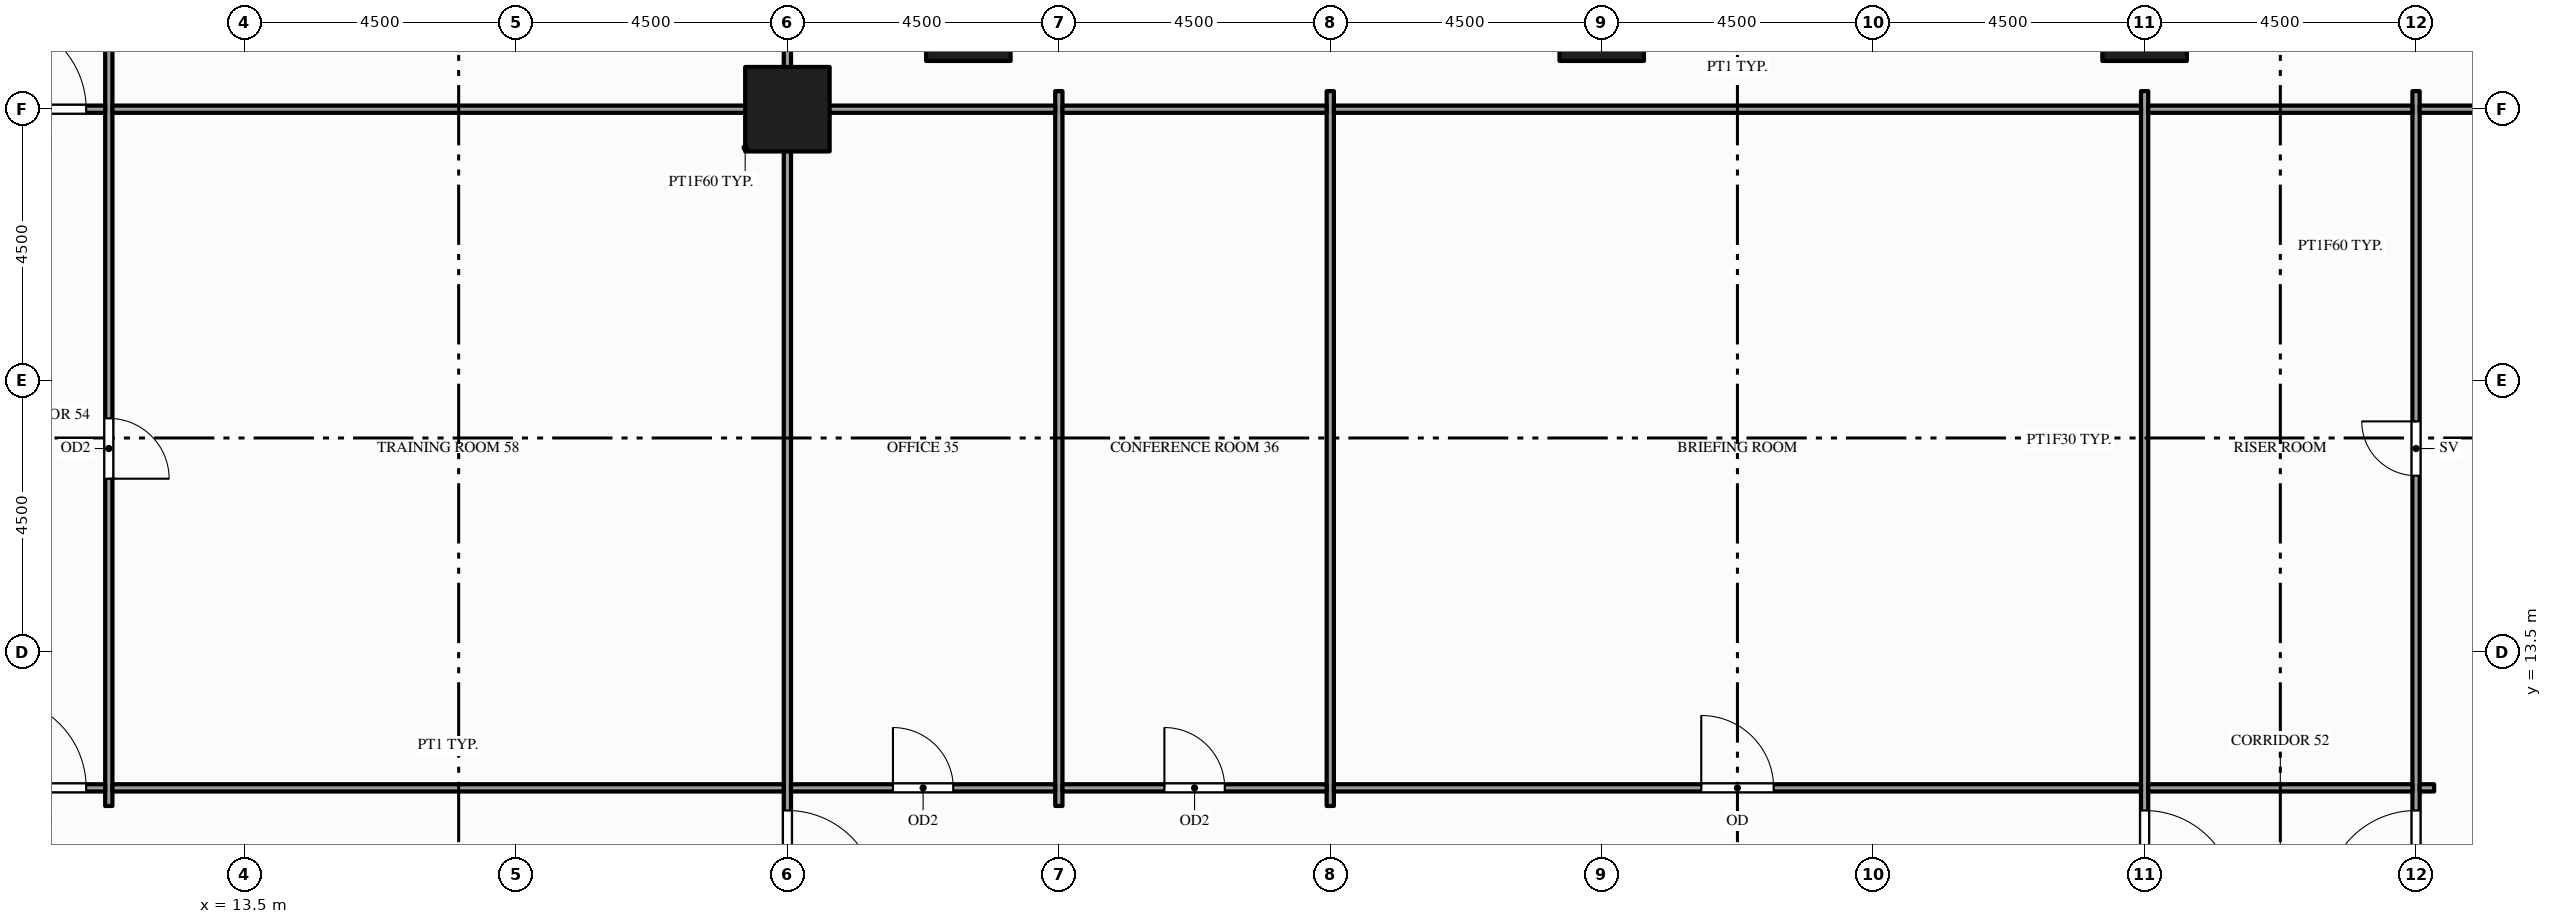
"""IFC4 building model, lengths in metres.
Left out: names, types, materials, properties, quantities, classifications, styles, units other than length and angle.
Written with IfcOpenShell. Run it as: python <this file> out.ifc"""

import sys

from ifc_helpers import new_model, si_unit, direction, frame, frame_2d, origin, origin_2d, place, context, subcontext, project, spatial, rectangle, hollow_rectangle, extrude, element, fill, save


model = new_model("IFC4")
c1 = context("Model", 3, precision=1e-05, world=origin(), true_north=direction((0.0, 1.0)))
c2 = subcontext(c1, "Body", "Model", "MODEL_VIEW")
j1 = project(units=[si_unit("LENGTHUNIT", "METRE"), si_unit("PLANEANGLEUNIT", "RADIAN")], contexts=[c1])
p1 = place(None, origin())
s1 = spatial("IfcSite", under=j1, at=p1, CompositionType="ELEMENT")
p2 = place(p1, origin())
s2 = spatial("IfcBuilding", under=s1, at=p2, CompositionType="ELEMENT")
p3 = place(p2, frame((0.0, 0.0, 14.0)))
s3 = spatial("IfcBuildingStorey", under=s2, at=p3, CompositionType="ELEMENT", Elevation=14.0)
for number, where, z_axis, x_axis in (
    (1, (22.5, 22.5, -0.25), (0.0, 0.0, 1.0), (1.0, 0.0, 0.0)),
    (2, (25.5, 24.0, -0.25), (0.0, 0.0, 1.0), (1.0, 0.0, 0.0)),
    (3, (36.0, 24.0, -0.25), (0.0, 0.0, 1.0), (1.0, 0.0, 0.0)),
    (4, (45.0, 24.0, -0.25), (0.0, 0.0, 1.0), (1.0, 0.0, 0.0)),
):
    element("IfcColumn", number, at=place(p3, frame(where, z_axis=z_axis, x_axis=x_axis)), inside=s3, PredefinedType="COLUMN", context=c2, shape_type="SweptSolid", body=[
        extrude(hollow_rectangle(XDim=1.4, YDim=1.4, WallThickness=0.08, at=origin_2d()), origin(), (0.0, 0.0, 1.0), 5.0),
    ])
p4 = place(p3, frame((11.25, 10.95, 0.0), z_axis=(0.0, 0.0, 1.0), x_axis=(0.0, 1.0, 0.0)))
e5 = element("IfcWall", 5, at=p4, inside=s3, PredefinedType="PARTITIONING", context=c2, shape_type="SweptSolid", body=[
    extrude(rectangle(XDim=20.85, YDim=0.12, at=frame_2d((10.425, 0.0))), origin(), (0.0, 0.0, 1.0), 3.5),
])
p5 = place(p4, frame((5.425, 0.0, 0.0)))
e6 = element("IfcOpeningElement", 6, at=p5, cuts=e5, PredefinedType="OPENING", context=c2, shape_type="SweptSolid", body=[
    extrude(rectangle(XDim=1.0, YDim=2.1, at=frame_2d((0.5, 1.05))), frame((0.0, 0.07, 0.0), z_axis=(0.0, -1.0, 0.0), x_axis=(1.0, 0.0, 0.0)), (0.0, 0.0, 1.0), 0.14),
])
p6 = place(p4, frame((14.425, 0.0, 0.0)))
e7 = element("IfcOpeningElement", 7, at=p6, cuts=e5, PredefinedType="OPENING", context=c2, shape_type="SweptSolid", body=[
    extrude(rectangle(XDim=1.0, YDim=2.1, at=frame_2d((0.5, 1.05))), frame((0.0, 0.07, 0.0), z_axis=(0.0, -1.0, 0.0), x_axis=(1.0, 0.0, 0.0)), (0.0, 0.0, 1.0), 0.14),
])
p7 = place(p4, frame((18.925, 0.0, 0.0)))
e8 = element("IfcOpeningElement", 8, at=p7, cuts=e5, PredefinedType="OPENING", context=c2, shape_type="SweptSolid", body=[
    extrude(rectangle(XDim=1.0, YDim=2.1, at=frame_2d((0.5, 1.05))), frame((0.0, 0.07, 0.0), z_axis=(0.0, -1.0, 0.0), x_axis=(1.0, 0.0, 0.0)), (0.0, 0.0, 1.0), 0.14),
])
p8 = place(p3, frame((22.5, 0.15, 0.0), z_axis=(0.0, 0.0, 1.0), x_axis=(0.0, 1.0, 0.0)))
e9 = element("IfcWall", 9, at=p8, inside=s3, PredefinedType="PARTITIONING", context=c2, shape_type="SweptSolid", body=[
    extrude(rectangle(XDim=35.95, YDim=0.12, at=frame_2d((17.975, 0.0))), origin(), (0.0, 0.0, 1.0), 3.759),
])
p9 = place(p8, frame((9.225, 0.0, 0.0)))
e10 = element("IfcOpeningElement", 10, at=p9, cuts=e9, PredefinedType="OPENING", context=c2, shape_type="SweptSolid", body=[
    extrude(rectangle(XDim=1.5, YDim=2.1, at=frame_2d((0.75, 1.05))), frame((0.0, 0.07, 0.0), z_axis=(0.0, -1.0, 0.0), x_axis=(1.0, 0.0, 0.0)), (0.0, 0.0, 1.0), 0.14),
])
p10 = place(p8, frame((32.7, 0.0, 0.0)))
e11 = element("IfcOpeningElement", 11, at=p10, cuts=e9, PredefinedType="OPENING", context=c2, shape_type="SweptSolid", body=[
    extrude(rectangle(XDim=1.8, YDim=2.1, at=frame_2d((0.9, 1.05))), frame((0.0, 0.07, 0.0), z_axis=(0.0, -1.0, 0.0), x_axis=(1.0, 0.0, 0.0)), (0.0, 0.0, 1.0), 0.14),
])
for number, where, z_axis, x_axis in (
    (12, (27.0, 10.95, 0.0), (0.0, 0.0, 1.0), (0.0, 1.0, 0.0)),
    (13, (31.5, 10.95, 0.0), (0.0, 0.0, 1.0), (0.0, 1.0, 0.0)),
):
    element("IfcWall", number, at=place(p3, frame(where, z_axis=z_axis, x_axis=x_axis)), inside=s3, PredefinedType="PARTITIONING", context=c2, shape_type="SweptSolid", body=[
        extrude(rectangle(XDim=11.85, YDim=0.12, at=frame_2d((5.925, 0.0))), origin(), (0.0, 0.0, 1.0), 3.759),
    ])
p11 = place(p3, frame((45.0, 0.15, 0.0), z_axis=(0.0, 0.0, 1.0), x_axis=(0.0, 1.0, 0.0)))
e14 = element("IfcWall", 14, at=p11, inside=s3, PredefinedType="PARTITIONING", context=c2, shape_type="SweptSolid", body=[
    extrude(rectangle(XDim=22.65, YDim=0.12, at=frame_2d((11.325, 0.0))), origin(), (0.0, 0.0, 1.0), 3.759),
])
p12 = place(p11, frame((9.225, 0.0, 0.0)))
e15 = element("IfcOpeningElement", 15, at=p12, cuts=e14, PredefinedType="OPENING", context=c2, shape_type="SweptSolid", body=[
    extrude(rectangle(XDim=1.5, YDim=2.1, at=frame_2d((0.75, 1.05))), frame((0.0, 0.07, 0.0), z_axis=(0.0, -1.0, 0.0), x_axis=(1.0, 0.0, 0.0)), (0.0, 0.0, 1.0), 0.14),
])
p13 = place(p3, frame((49.5, 0.15, 0.0), z_axis=(0.0, 0.0, 1.0), x_axis=(0.0, 1.0, 0.0)))
e16 = element("IfcWall", 16, at=p13, inside=s3, PredefinedType="PARTITIONING", context=c2, shape_type="SweptSolid", body=[
    extrude(rectangle(XDim=22.65, YDim=0.12, at=frame_2d((11.325, 0.0))), origin(), (0.0, 0.0, 1.0), 3.759),
])
p14 = place(p13, frame((0.955, 0.0, 0.0)))
e17 = element("IfcOpeningElement", 17, at=p14, cuts=e16, PredefinedType="OPENING", context=c2, shape_type="SweptSolid", body=[
    extrude(rectangle(XDim=0.9, YDim=2.1, at=frame_2d((0.45, 1.05))), frame((0.0, 0.07, 0.0), z_axis=(0.0, -1.0, 0.0), x_axis=(1.0, 0.0, 0.0)), (0.0, 0.0, 1.0), 0.14),
])
p15 = place(p13, frame((3.9, 0.0, 0.0)))
e18 = element("IfcOpeningElement", 18, at=p15, cuts=e16, PredefinedType="OPENING", context=c2, shape_type="SweptSolid", body=[
    extrude(rectangle(XDim=0.9, YDim=2.1, at=frame_2d((0.45, 1.05))), frame((0.0, 0.07, 0.0), z_axis=(0.0, -1.0, 0.0), x_axis=(1.0, 0.0, 0.0)), (0.0, 0.0, 1.0), 0.14),
])
p16 = place(p13, frame((6.85, 0.0, 0.0)))
e19 = element("IfcOpeningElement", 19, at=p16, cuts=e16, PredefinedType="OPENING", context=c2, shape_type="SweptSolid", body=[
    extrude(rectangle(XDim=1.0, YDim=2.1, at=frame_2d((0.5, 1.05))), frame((0.0, 0.07, 0.0), z_axis=(0.0, -1.0, 0.0), x_axis=(1.0, 0.0, 0.0)), (0.0, 0.0, 1.0), 0.14),
])
p17 = place(p13, frame((16.275, 0.0, 0.0)))
e20 = element("IfcOpeningElement", 20, at=p17, cuts=e16, PredefinedType="OPENING", context=c2, shape_type="SweptSolid", body=[
    extrude(rectangle(XDim=0.9, YDim=2.1, at=frame_2d((0.45, 1.05))), frame((0.0, 0.07, 0.0), z_axis=(0.0, -1.0, 0.0), x_axis=(1.0, 0.0, 0.0)), (0.0, 0.0, 1.0), 0.14),
])
p18 = place(p13, frame((9.225, 0.0, 0.0)))
e21 = element("IfcOpeningElement", 21, at=p18, cuts=e16, PredefinedType="OPENING", context=c2, shape_type="SweptSolid", body=[
    extrude(rectangle(XDim=1.5, YDim=2.1, at=frame_2d((0.75, 1.05))), frame((0.0, 0.07, 0.0), z_axis=(0.0, -1.0, 0.0), x_axis=(1.0, 0.0, 0.0)), (0.0, 0.0, 1.0), 0.14),
])
p19 = place(p3, frame((9.06, 11.25, 0.0), z_axis=(0.0, 0.0, 1.0), x_axis=(1.0, 0.0, 0.0)))
e22 = element("IfcWall", 22, at=p19, inside=s3, PredefinedType="PARTITIONING", context=c2, shape_type="SweptSolid", body=[
    extrude(rectangle(XDim=2.13, YDim=0.12, at=frame_2d((1.065, 0.0))), origin(), (0.0, 0.0, 1.0), 3.759),
])
p20 = place(p19, frame((0.315, 0.0, 0.0)))
e23 = element("IfcOpeningElement", 23, at=p20, cuts=e22, PredefinedType="OPENING", context=c2, shape_type="SweptSolid", body=[
    extrude(rectangle(XDim=1.5, YDim=2.1, at=frame_2d((0.75, 1.05))), frame((0.0, 0.07, 0.0), z_axis=(0.0, -1.0, 0.0), x_axis=(1.0, 0.0, 0.0)), (0.0, 0.0, 1.0), 0.14),
])
p21 = place(p3, frame((11.31, 11.25, 0.0), z_axis=(0.0, 0.0, 1.0), x_axis=(1.0, 0.0, 0.0)))
e24 = element("IfcWall", 24, at=p21, inside=s3, PredefinedType="PARTITIONING", context=c2, shape_type="SweptSolid", body=[
    extrude(rectangle(XDim=11.13, YDim=0.12, at=frame_2d((5.565, 0.0))), origin(), (0.0, 0.0, 1.0), 3.759),
])
p22 = place(p3, frame((22.56, 11.25, 0.0), z_axis=(0.0, 0.0, 1.0), x_axis=(1.0, 0.0, 0.0)))
e25 = element("IfcWall", 25, at=p22, inside=s3, PredefinedType="PARTITIONING", context=c2, shape_type="SweptSolid", body=[
    extrude(rectangle(XDim=4.38, YDim=0.12, at=frame_2d((2.19, 0.0))), origin(), (0.0, 0.0, 1.0), 3.66),
])
p23 = place(p22, frame((1.69, 0.0, 0.0)))
e26 = element("IfcOpeningElement", 26, at=p23, cuts=e25, PredefinedType="OPENING", context=c2, shape_type="SweptSolid", body=[
    extrude(rectangle(XDim=1.0, YDim=2.1, at=frame_2d((0.5, 1.05))), frame((0.0, 0.07, 0.0), z_axis=(0.0, -1.0, 0.0), x_axis=(1.0, 0.0, 0.0)), (0.0, 0.0, 1.0), 0.14),
])
p24 = place(p3, frame((27.06, 11.25, 0.0), z_axis=(0.0, 0.0, 1.0), x_axis=(1.0, 0.0, 0.0)))
e27 = element("IfcWall", 27, at=p24, inside=s3, PredefinedType="PARTITIONING", context=c2, shape_type="SweptSolid", body=[
    extrude(rectangle(XDim=4.38, YDim=0.12, at=frame_2d((2.19, 0.0))), origin(), (0.0, 0.0, 1.0), 3.66),
])
p25 = place(p24, frame((1.69, 0.0, 0.0)))
e28 = element("IfcOpeningElement", 28, at=p25, cuts=e27, PredefinedType="OPENING", context=c2, shape_type="SweptSolid", body=[
    extrude(rectangle(XDim=1.0, YDim=2.1, at=frame_2d((0.5, 1.05))), frame((0.0, 0.07, 0.0), z_axis=(0.0, -1.0, 0.0), x_axis=(1.0, 0.0, 0.0)), (0.0, 0.0, 1.0), 0.14),
])
p26 = place(p3, frame((31.56, 11.25, 0.0), z_axis=(0.0, 0.0, 1.0), x_axis=(1.0, 0.0, 0.0)))
e29 = element("IfcWall", 29, at=p26, inside=s3, PredefinedType="PARTITIONING", context=c2, shape_type="SweptSolid", body=[
    extrude(rectangle(XDim=13.38, YDim=0.12, at=frame_2d((6.69, 0.0))), origin(), (0.0, 0.0, 1.0), 3.66),
])
p27 = place(p26, frame((6.09, 0.0, 0.0)))
e30 = element("IfcOpeningElement", 30, at=p27, cuts=e29, PredefinedType="OPENING", context=c2, shape_type="SweptSolid", body=[
    extrude(rectangle(XDim=1.2, YDim=2.1, at=frame_2d((0.6, 1.05))), frame((0.0, 0.07, 0.0), z_axis=(0.0, -1.0, 0.0), x_axis=(1.0, 0.0, 0.0)), (0.0, 0.0, 1.0), 0.14),
])
p28 = place(p3, frame((45.06, 11.25, 0.0), z_axis=(0.0, 0.0, 1.0), x_axis=(1.0, 0.0, 0.0)))
e31 = element("IfcWall", 31, at=p28, inside=s3, PredefinedType="PARTITIONING", context=c2, shape_type="SweptSolid", body=[
    extrude(rectangle(XDim=4.38, YDim=0.12, at=frame_2d((2.19, 0.0))), origin(), (0.0, 0.0, 1.0), 3.66),
])
p29 = place(p3, frame((49.56, 11.25, 0.0), z_axis=(0.0, 0.0, 1.0), x_axis=(1.0, 0.0, 0.0)))
e32 = element("IfcWall", 32, at=p29, inside=s3, PredefinedType="PARTITIONING", context=c2, shape_type="SweptSolid", body=[
    extrude(rectangle(XDim=0.24, YDim=0.12, at=frame_2d((0.12, 0.0))), origin(), (0.0, 0.0, 1.0), 3.759),
])
p30 = place(p3, frame((9.06, 22.5, 0.0), z_axis=(0.0, 0.0, 1.0), x_axis=(1.0, 0.0, 0.0)))
e33 = element("IfcWall", 33, at=p30, inside=s3, PredefinedType="PARTITIONING", context=c2, shape_type="SweptSolid", body=[
    extrude(rectangle(XDim=2.13, YDim=0.12, at=frame_2d((1.065, 0.0))), origin(), (0.0, 0.0, 1.0), 3.5),
])
p31 = place(p30, frame((0.315, 0.0, 0.0)))
e34 = element("IfcOpeningElement", 34, at=p31, cuts=e33, PredefinedType="OPENING", context=c2, shape_type="SweptSolid", body=[
    extrude(rectangle(XDim=1.5, YDim=2.1, at=frame_2d((0.75, 1.05))), frame((0.0, 0.07, 0.0), z_axis=(0.0, -1.0, 0.0), x_axis=(1.0, 0.0, 0.0)), (0.0, 0.0, 1.0), 0.14),
])
p32 = place(p3, frame((11.31, 22.5, 0.0), z_axis=(0.0, 0.0, 1.0), x_axis=(1.0, 0.0, 0.0)))
e35 = element("IfcWall", 35, at=p32, inside=s3, PredefinedType="PARTITIONING", context=c2, shape_type="SweptSolid", body=[
    extrude(rectangle(XDim=11.13, YDim=0.12, at=frame_2d((5.565, 0.0))), origin(), (0.0, 0.0, 1.0), 3.5),
])
for number, where, z_axis, x_axis in (
    (36, (22.56, 22.5, 0.0), (0.0, 0.0, 1.0), (1.0, 0.0, 0.0)),
    (37, (27.06, 22.5, 0.0), (0.0, 0.0, 1.0), (1.0, 0.0, 0.0)),
):
    element("IfcWall", number, at=place(p3, frame(where, z_axis=z_axis, x_axis=x_axis)), inside=s3, PredefinedType="PARTITIONING", context=c2, shape_type="SweptSolid", body=[
        extrude(rectangle(XDim=4.38, YDim=0.12, at=frame_2d((2.19, 0.0))), origin(), (0.0, 0.0, 1.0), 3.66),
    ])
p33 = place(p3, frame((31.56, 22.5, 0.0), z_axis=(0.0, 0.0, 1.0), x_axis=(1.0, 0.0, 0.0)))
e38 = element("IfcWall", 38, at=p33, inside=s3, PredefinedType="PARTITIONING", context=c2, shape_type="SweptSolid", body=[
    extrude(rectangle(XDim=13.38, YDim=0.12, at=frame_2d((6.69, 0.0))), origin(), (0.0, 0.0, 1.0), 3.66),
])
p34 = place(p3, frame((45.06, 22.5, 0.0), z_axis=(0.0, 0.0, 1.0), x_axis=(1.0, 0.0, 0.0)))
e39 = element("IfcWall", 39, at=p34, inside=s3, PredefinedType="PARTITIONING", context=c2, shape_type="SweptSolid", body=[
    extrude(rectangle(XDim=4.38, YDim=0.12, at=frame_2d((2.19, 0.0))), origin(), (0.0, 0.0, 1.0), 3.66),
])
p35 = place(p3, frame((49.56, 22.5, 0.0), z_axis=(0.0, 0.0, 1.0), x_axis=(1.0, 0.0, 0.0)))
e40 = element("IfcWall", 40, at=p35, inside=s3, PredefinedType="PARTITIONING", context=c2, shape_type="SweptSolid", body=[
    extrude(rectangle(XDim=4.54, YDim=0.12, at=frame_2d((2.27, 0.0))), origin(), (0.0, 0.0, 1.0), 3.66),
])
p36 = place(p35, frame((1.29, 0.0, 0.0)))
e41 = element("IfcOpeningElement", 41, at=p36, cuts=e40, PredefinedType="OPENING", context=c2, shape_type="SweptSolid", body=[
    extrude(rectangle(XDim=1.8, YDim=2.1, at=frame_2d((0.9, 1.05))), frame((0.0, 0.07, 0.0), z_axis=(0.0, -1.0, 0.0), x_axis=(1.0, 0.0, 0.0)), (0.0, 0.0, 1.0), 0.14),
])
p37 = place(p17, origin())
e42 = element("IfcDoor", 42, at=p37, inside=s3, OperationType="SINGLE_SWING_RIGHT", PredefinedType="DOOR", context=c2, shape_type="SweptSolid", body=[
    extrude(rectangle(XDim=0.9, YDim=2.1, at=frame_2d((0.45, 1.05))), frame((0.0, 0.025, 0.0), z_axis=(0.0, -1.0, 0.0), x_axis=(1.0, 0.0, 0.0)), (0.0, 0.0, 1.0), 0.05),
])
fill(e20, e42)
p38 = place(p18, origin())
e43 = element("IfcDoor", 43, at=p38, inside=s3, OperationType="SINGLE_SWING_LEFT", PredefinedType="DOOR", context=c2, shape_type="SweptSolid", body=[
    extrude(rectangle(XDim=1.5, YDim=2.1, at=frame_2d((0.75, 1.05))), frame((0.0, 0.025, 0.0), z_axis=(0.0, -1.0, 0.0), x_axis=(1.0, 0.0, 0.0)), (0.0, 0.0, 1.0), 0.05),
])
fill(e21, e43)
p39 = place(p12, origin())
e44 = element("IfcDoor", 44, at=p39, inside=s3, OperationType="SINGLE_SWING_LEFT", PredefinedType="DOOR", context=c2, shape_type="SweptSolid", body=[
    extrude(rectangle(XDim=1.5, YDim=2.1, at=frame_2d((0.75, 1.05))), frame((0.0, 0.025, 0.0), z_axis=(0.0, -1.0, 0.0), x_axis=(1.0, 0.0, 0.0)), (0.0, 0.0, 1.0), 0.05),
])
fill(e15, e44)
p40 = place(p23, origin())
e45 = element("IfcDoor", 45, at=p40, inside=s3, OperationType="SINGLE_SWING_LEFT", PredefinedType="DOOR", context=c2, shape_type="SweptSolid", body=[
    extrude(rectangle(XDim=1.0, YDim=2.1, at=frame_2d((0.5, 1.05))), frame((0.0, 0.025, 0.0), z_axis=(0.0, -1.0, 0.0), x_axis=(1.0, 0.0, 0.0)), (0.0, 0.0, 1.0), 0.05),
])
fill(e26, e45)
p41 = place(p25, origin())
e46 = element("IfcDoor", 46, at=p41, inside=s3, OperationType="SINGLE_SWING_LEFT", PredefinedType="DOOR", context=c2, shape_type="SweptSolid", body=[
    extrude(rectangle(XDim=1.0, YDim=2.1, at=frame_2d((0.5, 1.05))), frame((0.0, 0.025, 0.0), z_axis=(0.0, -1.0, 0.0), x_axis=(1.0, 0.0, 0.0)), (0.0, 0.0, 1.0), 0.05),
])
fill(e28, e46)
p42 = place(p27, origin())
e47 = element("IfcDoor", 47, at=p42, inside=s3, OperationType="SINGLE_SWING_LEFT", PredefinedType="DOOR", context=c2, shape_type="SweptSolid", body=[
    extrude(rectangle(XDim=1.2, YDim=2.1, at=frame_2d((0.6, 1.05))), frame((0.0, 0.025, 0.0), z_axis=(0.0, -1.0, 0.0), x_axis=(1.0, 0.0, 0.0)), (0.0, 0.0, 1.0), 0.05),
])
fill(e30, e47)
p43 = place(p9, origin())
e48 = element("IfcDoor", 48, at=p43, inside=s3, OperationType="SINGLE_SWING_LEFT", PredefinedType="DOOR", context=c2, shape_type="SweptSolid", body=[
    extrude(rectangle(XDim=1.5, YDim=2.1, at=frame_2d((0.75, 1.05))), frame((0.0, 0.025, 0.0), z_axis=(0.0, -1.0, 0.0), x_axis=(1.0, 0.0, 0.0)), (0.0, 0.0, 1.0), 0.05),
])
fill(e10, e48)
p44 = place(p20, origin())
e49 = element("IfcDoor", 49, at=p44, inside=s3, OperationType="SINGLE_SWING_LEFT", PredefinedType="DOOR", context=c2, shape_type="SweptSolid", body=[
    extrude(rectangle(XDim=1.5, YDim=2.1, at=frame_2d((0.75, 1.05))), frame((0.0, 0.025, 0.0), z_axis=(0.0, -1.0, 0.0), x_axis=(1.0, 0.0, 0.0)), (0.0, 0.0, 1.0), 0.05),
])
fill(e23, e49)
p45 = place(p5, origin())
e50 = element("IfcDoor", 50, at=p45, inside=s3, OperationType="SINGLE_SWING_LEFT", PredefinedType="DOOR", context=c2, shape_type="SweptSolid", body=[
    extrude(rectangle(XDim=1.0, YDim=2.1, at=frame_2d((0.5, 1.05))), frame((0.0, 0.025, 0.0), z_axis=(0.0, -1.0, 0.0), x_axis=(1.0, 0.0, 0.0)), (0.0, 0.0, 1.0), 0.05),
])
fill(e6, e50)
p46 = place(p31, origin())
e51 = element("IfcDoor", 51, at=p46, inside=s3, OperationType="SINGLE_SWING_LEFT", PredefinedType="DOOR", context=c2, shape_type="SweptSolid", body=[
    extrude(rectangle(XDim=1.5, YDim=2.1, at=frame_2d((0.75, 1.05))), frame((0.0, 0.025, 0.0), z_axis=(0.0, -1.0, 0.0), x_axis=(1.0, 0.0, 0.0)), (0.0, 0.0, 1.0), 0.05),
])
fill(e34, e51)
save(model, sys.argv[1])
